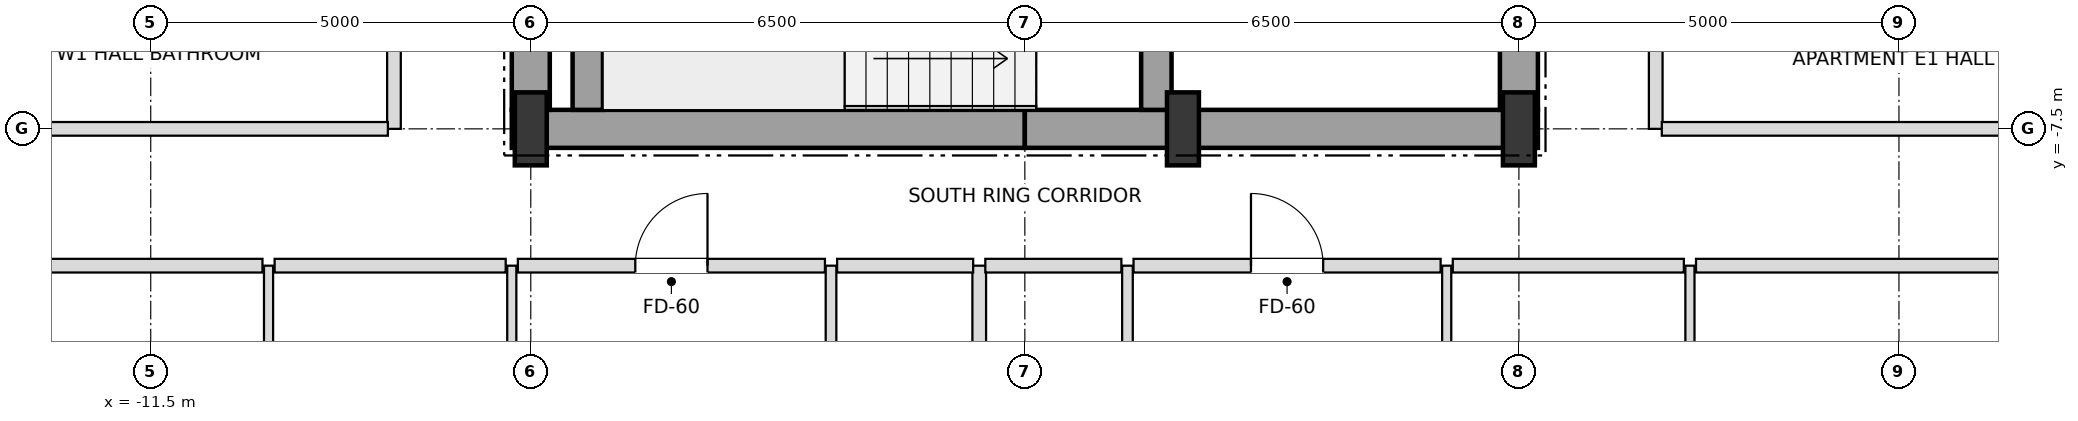
"""IFC4 building model, lengths in metres.
Left out: names, types, materials, properties, quantities, classifications, styles, units other than length and angle.
Written with IfcOpenShell. Run it as: python <this file> out.ifc"""

import sys

from ifc_helpers import new_model, si_unit, direction, frame, frame_2d, origin, origin_2d, place, context, subcontext, project, spatial, rectangle, i_section, extrude, element, fill, save


model = new_model("IFC4")
c1 = context("Model", 3, precision=1e-05, world=origin(), true_north=direction((0.0, 1.0)))
c2 = subcontext(c1, "Body", "Model", "MODEL_VIEW")
j1 = project(units=[si_unit("LENGTHUNIT", "METRE"), si_unit("PLANEANGLEUNIT", "RADIAN")], contexts=[c1])
p1 = place(None, origin())
s1 = spatial("IfcSite", under=j1, at=p1, CompositionType="ELEMENT")
p2 = place(p1, origin())
s2 = spatial("IfcBuilding", under=s1, at=p2, CompositionType="ELEMENT")
p3 = place(p2, frame((0.0, 0.0, 68.4)))
s3 = spatial("IfcBuildingStorey", under=s2, at=p3, CompositionType="ELEMENT", Elevation=68.4)
for number, where, z_axis, x_axis in (
    (1, (-6.5, -7.5, 0.0), (0.0, 0.0, 1.0), (1.0, 0.0, 0.0)),
    (2, (2.08, -7.5, 0.0), (0.0, 0.0, 1.0), (1.0, 0.0, 0.0)),
    (3, (6.5, -7.5, 0.0), (0.0, 0.0, 1.0), (1.0, 0.0, 0.0)),
):
    element("IfcColumn", number, at=place(p3, frame(where, z_axis=z_axis, x_axis=x_axis)), inside=s3, PredefinedType="COLUMN", context=c2, shape_type="SweptSolid", body=[
        extrude(i_section(OverallWidth=0.42, OverallDepth=0.96, WebThickness=0.022, FlangeThickness=0.034, at=origin_2d()), origin(), (0.0, 0.0, 1.0), 3.6),
    ])
for number, where, z_axis, x_axis in (
    (4, (-6.75, -7.5, 0.0), (0.0, 0.0, 1.0), (1.0, 0.0, 0.0)),
    (5, (0.0, -7.5, 0.0), (0.0, 0.0, 1.0), (1.0, 0.0, 0.0)),
):
    element("IfcWall", number, at=place(p3, frame(where, z_axis=z_axis, x_axis=x_axis)), inside=s3, PredefinedType="SHEAR", context=c2, shape_type="SweptSolid", body=[
        extrude(rectangle(XDim=6.75, YDim=0.5, at=frame_2d((3.375, 0.0))), origin(), (0.0, 0.0, 1.0), 3.38),
    ])
p4 = place(p3, frame((-6.5, -7.25, 0.0), z_axis=(0.0, 0.0, 1.0), x_axis=(0.0, 1.0, 0.0)))
e6 = element("IfcWall", 6, at=p4, inside=s3, PredefinedType="SHEAR", context=c2, shape_type="SweptSolid", body=[
    extrude(rectangle(XDim=3.55, YDim=0.5, at=frame_2d((1.775, 0.0))), origin(), (0.0, 0.0, 1.0), 3.38),
])
p5 = place(p3, frame((6.5, -7.25, 0.0), z_axis=(0.0, 0.0, 1.0), x_axis=(0.0, 1.0, 0.0)))
e7 = element("IfcWall", 7, at=p5, inside=s3, PredefinedType="SHEAR", context=c2, shape_type="SweptSolid", body=[
    extrude(rectangle(XDim=5.75, YDim=0.5, at=frame_2d((2.875, 0.0))), origin(), (0.0, 0.0, 1.0), 3.38),
])
p6 = place(p5, frame((0.85, 0.0, 0.0)))
e8 = element("IfcOpeningElement", 8, at=p6, cuts=e7, PredefinedType="OPENING", context=c2, shape_type="SweptSolid", body=[
    extrude(rectangle(XDim=1.05, YDim=2.15, at=frame_2d((0.525, 1.075))), frame((0.0, 0.26, 0.0), z_axis=(0.0, -1.0, 0.0), x_axis=(1.0, 0.0, 0.0)), (0.0, 0.0, 1.0), 0.52),
])
p7 = place(p3, frame((-5.75, -7.25, 0.0), z_axis=(0.0, 0.0, 1.0), x_axis=(0.0, 1.0, 0.0)))
e9 = element("IfcWall", 9, at=p7, inside=s3, PredefinedType="SHEAR", context=c2, shape_type="SweptSolid", body=[
    extrude(rectangle(XDim=2.9, YDim=0.4, at=frame_2d((1.45, 0.0))), origin(), (0.0, 0.0, 1.0), 3.38),
])
p8 = place(p3, frame((1.73, -7.25, 0.0), z_axis=(0.0, 0.0, 1.0), x_axis=(0.0, 1.0, 0.0)))
e10 = element("IfcWall", 10, at=p8, inside=s3, PredefinedType="SHEAR", context=c2, shape_type="SweptSolid", body=[
    extrude(rectangle(XDim=3.3, YDim=0.4, at=frame_2d((1.65, 0.0))), origin(), (0.0, 0.0, 1.0), 3.38),
])
p9 = place(p8, frame((0.9, 0.0, 0.0)))
e11 = element("IfcOpeningElement", 11, at=p9, cuts=e10, PredefinedType="OPENING", context=c2, shape_type="SweptSolid", body=[
    extrude(rectangle(XDim=1.05, YDim=2.15, at=frame_2d((0.525, 1.075))), frame((0.0, 0.21, 0.0), z_axis=(0.0, -1.0, 0.0), x_axis=(1.0, 0.0, 0.0)), (0.0, 0.0, 1.0), 0.42),
])
p10 = place(p3, frame((-9.95, -18.9, 0.0), z_axis=(0.0, 0.0, 1.0), x_axis=(0.0, 1.0, 0.0)))
e12 = element("IfcWall", 12, at=p10, inside=s3, PredefinedType="PARTITIONING", context=c2, shape_type="SweptSolid", body=[
    extrude(rectangle(XDim=9.6, YDim=0.12, at=frame_2d((4.8, 0.0))), origin(), (0.0, 0.0, 1.0), 2.816),
])
p11 = place(p10, frame((4.35, 0.0, 0.0)))
e13 = element("IfcOpeningElement", 13, at=p11, cuts=e12, PredefinedType="OPENING", context=c2, shape_type="SweptSolid", body=[
    extrude(rectangle(XDim=0.9, YDim=2.1, at=frame_2d((0.45, 1.05))), frame((0.0, 0.07, 0.0), z_axis=(0.0, -1.0, 0.0), x_axis=(1.0, 0.0, 0.0)), (0.0, 0.0, 1.0), 0.14),
])
p12 = place(p3, frame((-8.3, -7.5, 0.0), z_axis=(0.0, 0.0, 1.0), x_axis=(0.0, 1.0, 0.0)))
e14 = element("IfcWall", 14, at=p12, inside=s3, PredefinedType="PARTITIONING", context=c2, shape_type="SweptSolid", body=[
    extrude(rectangle(XDim=15.0, YDim=0.18, at=frame_2d((7.5, 0.0))), origin(), (0.0, 0.0, 1.0), 3.38),
])
p13 = place(p12, frame((3.475, 0.0, 0.0)))
e15 = element("IfcOpeningElement", 15, at=p13, cuts=e14, PredefinedType="OPENING", context=c2, shape_type="SweptSolid", body=[
    extrude(rectangle(XDim=0.95, YDim=2.15, at=frame_2d((0.475, 1.075))), frame((0.0, 0.1, 0.0), z_axis=(0.0, -1.0, 0.0), x_axis=(1.0, 0.0, 0.0)), (0.0, 0.0, 1.0), 0.2),
])
p14 = place(p3, frame((-6.75, -24.9, 0.0), z_axis=(0.0, 0.0, 1.0), x_axis=(0.0, 1.0, 0.0)))
e16 = element("IfcWall", 16, at=p14, inside=s3, PredefinedType="PARTITIONING", context=c2, shape_type="SweptSolid", body=[
    extrude(rectangle(XDim=15.6, YDim=0.12, at=frame_2d((7.8, 0.0))), origin(), (0.0, 0.0, 1.0), 2.816),
])
p15 = place(p14, frame((10.325, 0.0, 0.0)))
e17 = element("IfcOpeningElement", 17, at=p15, cuts=e16, PredefinedType="OPENING", context=c2, shape_type="SweptSolid", body=[
    extrude(rectangle(XDim=0.95, YDim=2.1, at=frame_2d((0.475, 1.05))), frame((0.0, 0.07, 0.0), z_axis=(0.0, -1.0, 0.0), x_axis=(1.0, 0.0, 0.0)), (0.0, 0.0, 1.0), 0.14),
])
p16 = place(p14, frame((2.55, 0.0, 0.0)))
e18 = element("IfcOpeningElement", 18, at=p16, cuts=e16, PredefinedType="OPENING", context=c2, shape_type="SweptSolid", body=[
    extrude(rectangle(XDim=0.9, YDim=2.1, at=frame_2d((0.45, 1.05))), frame((0.0, 0.07, 0.0), z_axis=(0.0, -1.0, 0.0), x_axis=(1.0, 0.0, 0.0)), (0.0, 0.0, 1.0), 0.14),
])
p17 = place(p3, frame((-2.55, -18.9, 0.0), z_axis=(0.0, 0.0, 1.0), x_axis=(0.0, 1.0, 0.0)))
e19 = element("IfcWall", 19, at=p17, inside=s3, PredefinedType="PARTITIONING", context=c2, shape_type="SweptSolid", body=[
    extrude(rectangle(XDim=9.6, YDim=0.14, at=frame_2d((4.8, 0.0))), origin(), (0.0, 0.0, 1.0), 2.948),
])
p18 = place(p17, frame((4.35, 0.0, 0.0)))
e20 = element("IfcOpeningElement", 20, at=p18, cuts=e19, PredefinedType="OPENING", context=c2, shape_type="SweptSolid", body=[
    extrude(rectangle(XDim=0.9, YDim=2.1, at=frame_2d((0.45, 1.05))), frame((0.0, 0.08, 0.0), z_axis=(0.0, -1.0, 0.0), x_axis=(1.0, 0.0, 0.0)), (0.0, 0.0, 1.0), 0.16),
])
p19 = place(p3, frame((-0.6, -24.9, 0.0), z_axis=(0.0, 0.0, 1.0), x_axis=(0.0, 1.0, 0.0)))
e21 = element("IfcWall", 21, at=p19, inside=s3, PredefinedType="PARTITIONING", context=c2, shape_type="SweptSolid", body=[
    extrude(rectangle(XDim=15.6, YDim=0.18, at=frame_2d((7.8, 0.0))), origin(), (0.0, 0.0, 1.0), 2.816),
])
p20 = place(p3, frame((1.35, -18.9, 0.0), z_axis=(0.0, 0.0, 1.0), x_axis=(0.0, 1.0, 0.0)))
e22 = element("IfcWall", 22, at=p20, inside=s3, PredefinedType="PARTITIONING", context=c2, shape_type="SweptSolid", body=[
    extrude(rectangle(XDim=9.6, YDim=0.14, at=frame_2d((4.8, 0.0))), origin(), (0.0, 0.0, 1.0), 2.948),
])
p21 = place(p20, frame((4.35, 0.0, 0.0)))
e23 = element("IfcOpeningElement", 23, at=p21, cuts=e22, PredefinedType="OPENING", context=c2, shape_type="SweptSolid", body=[
    extrude(rectangle(XDim=0.9, YDim=2.1, at=frame_2d((0.45, 1.05))), frame((0.0, 0.08, 0.0), z_axis=(0.0, -1.0, 0.0), x_axis=(1.0, 0.0, 0.0)), (0.0, 0.0, 1.0), 0.16),
])
p22 = place(p3, frame((5.55, -24.9, 0.0), z_axis=(0.0, 0.0, 1.0), x_axis=(0.0, 1.0, 0.0)))
e24 = element("IfcWall", 24, at=p22, inside=s3, PredefinedType="PARTITIONING", context=c2, shape_type="SweptSolid", body=[
    extrude(rectangle(XDim=15.6, YDim=0.12, at=frame_2d((7.8, 0.0))), origin(), (0.0, 0.0, 1.0), 2.816),
])
p23 = place(p22, frame((10.325, 0.0, 0.0)))
e25 = element("IfcOpeningElement", 25, at=p23, cuts=e24, PredefinedType="OPENING", context=c2, shape_type="SweptSolid", body=[
    extrude(rectangle(XDim=0.95, YDim=2.1, at=frame_2d((0.475, 1.05))), frame((0.0, 0.07, 0.0), z_axis=(0.0, -1.0, 0.0), x_axis=(1.0, 0.0, 0.0)), (0.0, 0.0, 1.0), 0.14),
])
p24 = place(p22, frame((2.55, 0.0, 0.0)))
e26 = element("IfcOpeningElement", 26, at=p24, cuts=e24, PredefinedType="OPENING", context=c2, shape_type="SweptSolid", body=[
    extrude(rectangle(XDim=0.9, YDim=2.1, at=frame_2d((0.45, 1.05))), frame((0.0, 0.07, 0.0), z_axis=(0.0, -1.0, 0.0), x_axis=(1.0, 0.0, 0.0)), (0.0, 0.0, 1.0), 0.14),
])
p25 = place(p3, frame((8.3, -7.5, 0.0), z_axis=(0.0, 0.0, 1.0), x_axis=(0.0, 1.0, 0.0)))
e27 = element("IfcWall", 27, at=p25, inside=s3, PredefinedType="PARTITIONING", context=c2, shape_type="SweptSolid", body=[
    extrude(rectangle(XDim=15.0, YDim=0.18, at=frame_2d((7.5, 0.0))), origin(), (0.0, 0.0, 1.0), 3.38),
])
p26 = place(p25, frame((3.305, 0.0, 0.0)))
e28 = element("IfcOpeningElement", 28, at=p26, cuts=e27, PredefinedType="OPENING", context=c2, shape_type="SweptSolid", body=[
    extrude(rectangle(XDim=0.95, YDim=2.15, at=frame_2d((0.475, 1.075))), frame((0.0, 0.1, 0.0), z_axis=(0.0, -1.0, 0.0), x_axis=(1.0, 0.0, 0.0)), (0.0, 0.0, 1.0), 0.2),
])
p27 = place(p25, frame((10.805, 0.0, 0.0)))
e29 = element("IfcOpeningElement", 29, at=p27, cuts=e27, PredefinedType="OPENING", context=c2, shape_type="SweptSolid", body=[
    extrude(rectangle(XDim=0.95, YDim=2.15, at=frame_2d((0.475, 1.075))), frame((0.0, 0.1, 0.0), z_axis=(0.0, -1.0, 0.0), x_axis=(1.0, 0.0, 0.0)), (0.0, 0.0, 1.0), 0.2),
])
p28 = place(p3, frame((8.75, -24.9, 0.0), z_axis=(0.0, 0.0, 1.0), x_axis=(0.0, 1.0, 0.0)))
e30 = element("IfcWall", 30, at=p28, inside=s3, PredefinedType="PARTITIONING", context=c2, shape_type="SweptSolid", body=[
    extrude(rectangle(XDim=15.6, YDim=0.12, at=frame_2d((7.8, 0.0))), origin(), (0.0, 0.0, 1.0), 2.816),
])
p29 = place(p28, frame((10.325, 0.0, 0.0)))
e31 = element("IfcOpeningElement", 31, at=p29, cuts=e30, PredefinedType="OPENING", context=c2, shape_type="SweptSolid", body=[
    extrude(rectangle(XDim=0.95, YDim=2.1, at=frame_2d((0.475, 1.05))), frame((0.0, 0.07, 0.0), z_axis=(0.0, -1.0, 0.0), x_axis=(1.0, 0.0, 0.0)), (0.0, 0.0, 1.0), 0.14),
])
p30 = place(p28, frame((2.55, 0.0, 0.0)))
e32 = element("IfcOpeningElement", 32, at=p30, cuts=e30, PredefinedType="OPENING", context=c2, shape_type="SweptSolid", body=[
    extrude(rectangle(XDim=0.9, YDim=2.1, at=frame_2d((0.45, 1.05))), frame((0.0, 0.07, 0.0), z_axis=(0.0, -1.0, 0.0), x_axis=(1.0, 0.0, 0.0)), (0.0, 0.0, 1.0), 0.14),
])
p31 = place(p3, frame((-18.32, -9.3, 0.0), z_axis=(0.0, 0.0, 1.0), x_axis=(1.0, 0.0, 0.0)))
e33 = element("IfcWall", 33, at=p31, inside=s3, PredefinedType="PARTITIONING", context=c2, shape_type="SweptSolid", body=[
    extrude(rectangle(XDim=8.29, YDim=0.18, at=frame_2d((4.145, 0.0))), origin(), (0.0, 0.0, 1.0), 2.816),
])
p32 = place(p3, frame((-9.87, -9.3, 0.0), z_axis=(0.0, 0.0, 1.0), x_axis=(1.0, 0.0, 0.0)))
e34 = element("IfcWall", 34, at=p32, inside=s3, PredefinedType="PARTITIONING", context=c2, shape_type="SweptSolid", body=[
    extrude(rectangle(XDim=3.04, YDim=0.18, at=frame_2d((1.52, 0.0))), origin(), (0.0, 0.0, 1.0), 3.38),
])
p33 = place(p3, frame((-6.67, -9.3, 0.0), z_axis=(0.0, 0.0, 1.0), x_axis=(1.0, 0.0, 0.0)))
e35 = element("IfcWall", 35, at=p33, inside=s3, PredefinedType="PARTITIONING", context=c2, shape_type="SweptSolid", body=[
    extrude(rectangle(XDim=4.04, YDim=0.18, at=frame_2d((2.02, 0.0))), origin(), (0.0, 0.0, 1.0), 2.816),
])
p34 = place(p33, frame((1.545, 0.0, 0.0)))
e36 = element("IfcOpeningElement", 36, at=p34, cuts=e35, PredefinedType="OPENING", context=c2, shape_type="SweptSolid", body=[
    extrude(rectangle(XDim=0.95, YDim=2.15, at=frame_2d((0.475, 1.075))), frame((0.0, 0.1, 0.0), z_axis=(0.0, -1.0, 0.0), x_axis=(1.0, 0.0, 0.0)), (0.0, 0.0, 1.0), 0.2),
])
for number, where, z_axis, x_axis in (
    (37, (-2.47, -9.3, 0.0), (0.0, 0.0, 1.0), (1.0, 0.0, 0.0)),
    (38, (-0.52, -9.3, 0.0), (0.0, 0.0, 1.0), (1.0, 0.0, 0.0)),
):
    element("IfcWall", number, at=place(p3, frame(where, z_axis=z_axis, x_axis=x_axis)), inside=s3, PredefinedType="PARTITIONING", context=c2, shape_type="SweptSolid", body=[
        extrude(rectangle(XDim=1.79, YDim=0.18, at=frame_2d((0.895, 0.0))), origin(), (0.0, 0.0, 1.0), 3.38),
    ])
p35 = place(p3, frame((1.43, -9.3, 0.0), z_axis=(0.0, 0.0, 1.0), x_axis=(1.0, 0.0, 0.0)))
e39 = element("IfcWall", 39, at=p35, inside=s3, PredefinedType="PARTITIONING", context=c2, shape_type="SweptSolid", body=[
    extrude(rectangle(XDim=4.04, YDim=0.18, at=frame_2d((2.02, 0.0))), origin(), (0.0, 0.0, 1.0), 3.38),
])
p36 = place(p35, frame((1.545, 0.0, 0.0)))
e40 = element("IfcOpeningElement", 40, at=p36, cuts=e39, PredefinedType="OPENING", context=c2, shape_type="SweptSolid", body=[
    extrude(rectangle(XDim=0.95, YDim=2.15, at=frame_2d((0.475, 1.075))), frame((0.0, 0.1, 0.0), z_axis=(0.0, -1.0, 0.0), x_axis=(1.0, 0.0, 0.0)), (0.0, 0.0, 1.0), 0.2),
])
p37 = place(p3, frame((5.63, -9.3, 0.0), z_axis=(0.0, 0.0, 1.0), x_axis=(1.0, 0.0, 0.0)))
e41 = element("IfcWall", 41, at=p37, inside=s3, PredefinedType="PARTITIONING", context=c2, shape_type="SweptSolid", body=[
    extrude(rectangle(XDim=3.04, YDim=0.18, at=frame_2d((1.52, 0.0))), origin(), (0.0, 0.0, 1.0), 2.816),
])
p38 = place(p3, frame((8.83, -9.3, 0.0), z_axis=(0.0, 0.0, 1.0), x_axis=(1.0, 0.0, 0.0)))
e42 = element("IfcWall", 42, at=p38, inside=s3, PredefinedType="PARTITIONING", context=c2, shape_type="SweptSolid", body=[
    extrude(rectangle(XDim=9.49, YDim=0.18, at=frame_2d((4.745, 0.0))), origin(), (0.0, 0.0, 1.0), 2.816),
])
for number, where, z_axis, x_axis in (
    (43, (-16.02, -7.5, 0.0), (0.0, 0.0, 1.0), (1.0, 0.0, 0.0)),
    (44, (8.38, -7.5, 0.0), (0.0, 0.0, 1.0), (1.0, 0.0, 0.0)),
):
    element("IfcWall", number, at=place(p3, frame(where, z_axis=z_axis, x_axis=x_axis)), inside=s3, PredefinedType="PARTITIONING", context=c2, shape_type="SweptSolid", body=[
        extrude(rectangle(XDim=7.64, YDim=0.18, at=frame_2d((3.82, 0.0))), origin(), (0.0, 0.0, 1.0), 2.816),
    ])
p39 = place(p34, origin())
e45 = element("IfcDoor", 45, at=p39, inside=s3, OperationType="SINGLE_SWING_RIGHT", PredefinedType="DOOR", context=c2, shape_type="SweptSolid", body=[
    extrude(rectangle(XDim=0.95, YDim=2.15, at=frame_2d((0.475, 1.075))), frame((0.0, 0.025, 0.0), z_axis=(0.0, -1.0, 0.0), x_axis=(1.0, 0.0, 0.0)), (0.0, 0.0, 1.0), 0.05),
])
fill(e36, e45)
p40 = place(p36, origin())
e46 = element("IfcDoor", 46, at=p40, inside=s3, OperationType="SINGLE_SWING_LEFT", PredefinedType="DOOR", context=c2, shape_type="SweptSolid", body=[
    extrude(rectangle(XDim=0.95, YDim=2.15, at=frame_2d((0.475, 1.075))), frame((0.0, 0.025, 0.0), z_axis=(0.0, -1.0, 0.0), x_axis=(1.0, 0.0, 0.0)), (0.0, 0.0, 1.0), 0.05),
])
fill(e40, e46)
save(model, sys.argv[1])
